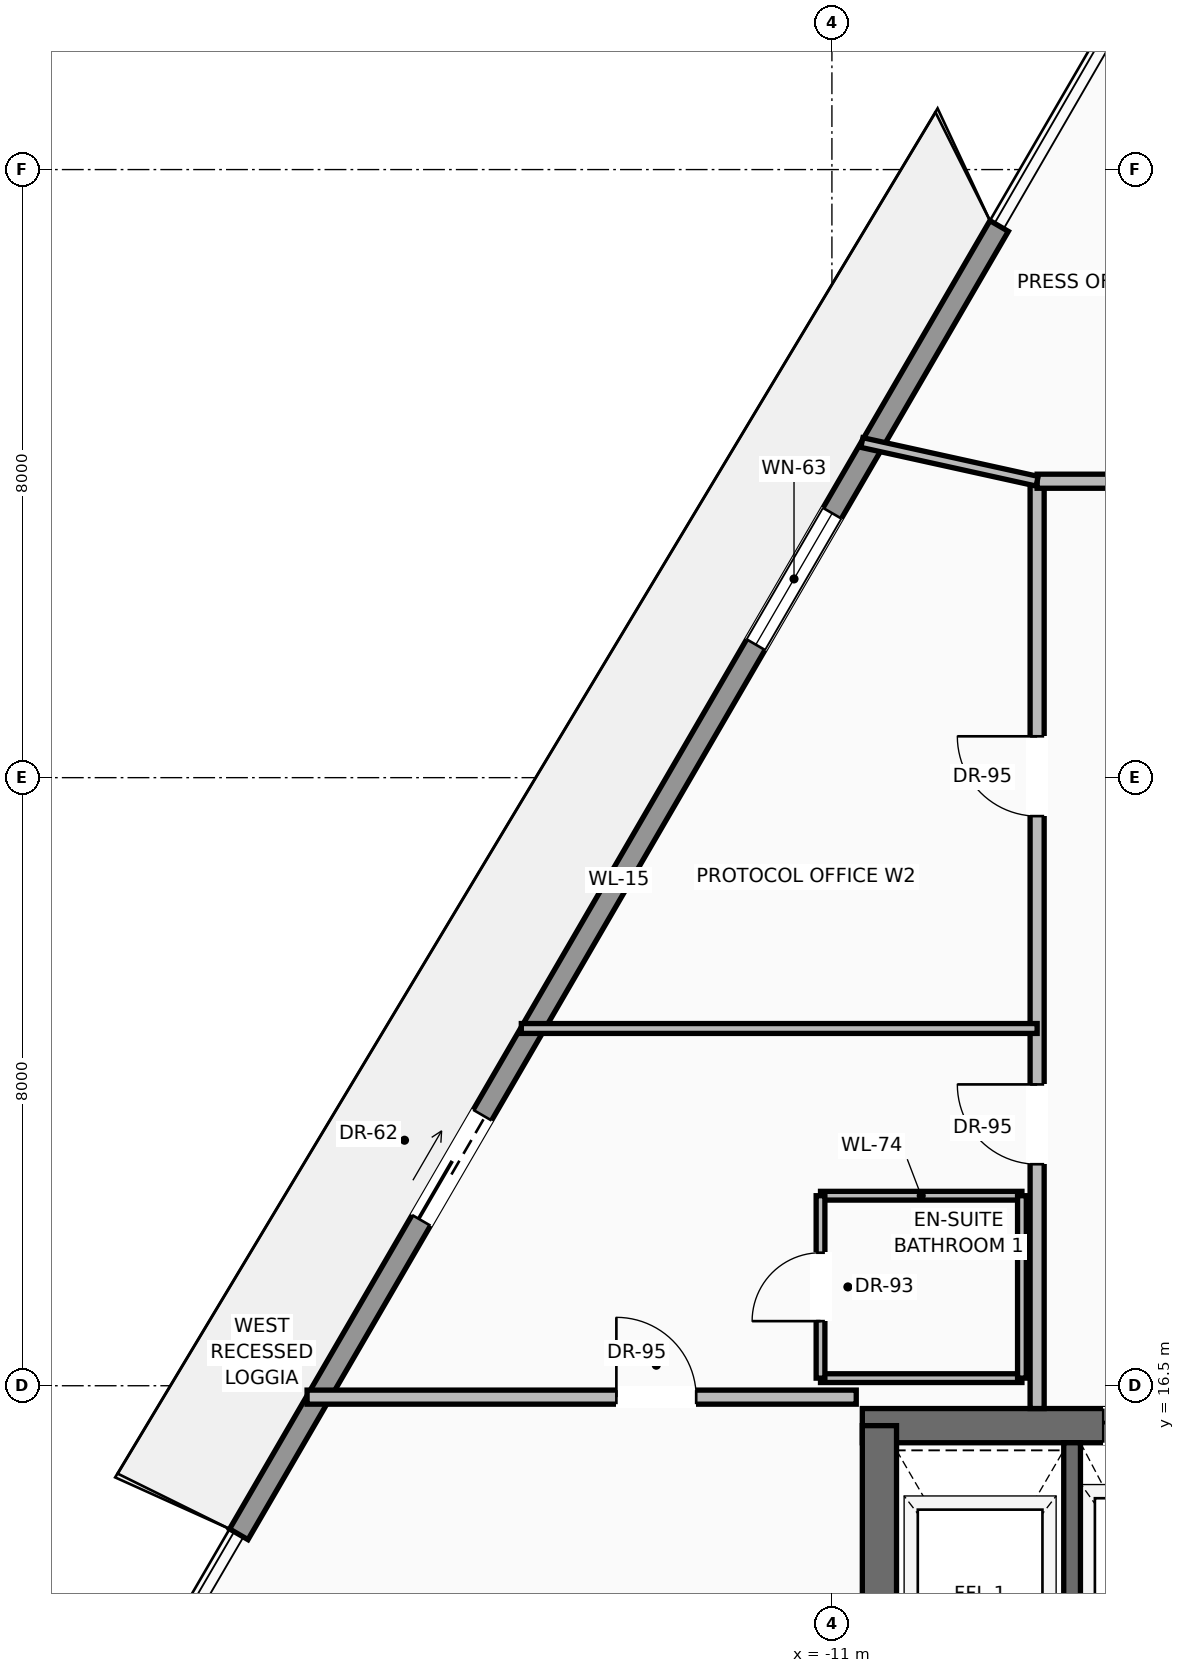
"""IFC4 building model, lengths in metres.
Left out: names, types, materials, properties, quantities, classifications, styles, units other than length and angle.
Written with IfcOpenShell. Run it as: python <this file> out.ifc"""

import sys

from ifc_helpers import new_model, si_unit, direction, frame, frame_2d, origin, place, context, subcontext, project, spatial, rectangle, extrude, source, transform, mapped, element, fill, save


model = new_model("IFC4")
c1 = context("Model", 3, precision=1e-05, world=origin(), true_north=direction((0.0, 1.0)))
c2 = subcontext(c1, "Body", "Model", "MODEL_VIEW")
j1 = project(units=[si_unit("LENGTHUNIT", "METRE"), si_unit("PLANEANGLEUNIT", "RADIAN")], contexts=[c1])
p1 = place(None, origin())
s1 = spatial("IfcSite", under=j1, at=p1, CompositionType="ELEMENT")
p2 = place(p1, origin())
s2 = spatial("IfcBuilding", under=s1, at=p2, CompositionType="ELEMENT")
p3 = place(p2, frame((0.0, 0.0, 262.65)))
s3 = spatial("IfcBuildingStorey", under=s2, at=p3, CompositionType="ELEMENT", Elevation=262.65)
p4 = place(p3, frame((-10.6, 15.975, 0.0), z_axis=(0.0, 0.0, 1.0), x_axis=(1.0, 0.0, 0.0)))
e1 = element("IfcWall", 1, at=p4, inside=s3, PredefinedType="SHEAR", context=c2, shape_type="SweptSolid", body=[
    extrude(rectangle(XDim=21.2, YDim=0.45, at=frame_2d((10.6, 0.0))), origin(), (0.0, 0.0, 1.0), 3.24),
])
p5 = place(p4, frame((3.17, 0.0, 0.0)))
e2 = element("IfcOpeningElement", 2, at=p5, cuts=e1, PredefinedType="OPENING", context=c2, shape_type="SweptSolid", body=[
    extrude(rectangle(XDim=1.3, YDim=2.3, at=frame_2d((0.65, 1.15))), frame((0.0, 0.235, 0.0), z_axis=(0.0, -1.0, 0.0), x_axis=(1.0, 0.0, 0.0)), (0.0, 0.0, 1.0), 0.47),
])
p6 = place(p4, frame((9.6, 0.0, 0.0)))
e3 = element("IfcOpeningElement", 3, at=p6, cuts=e1, PredefinedType="OPENING", context=c2, shape_type="SweptSolid", body=[
    extrude(rectangle(XDim=2.0, YDim=2.4, at=frame_2d((1.0, 1.2))), frame((0.0, 0.235, 0.0), z_axis=(0.0, -1.0, 0.0), x_axis=(1.0, 0.0, 0.0)), (0.0, 0.0, 1.0), 0.47),
])
p7 = place(p3, frame((-10.375, 0.625, 0.0), z_axis=(0.0, 0.0, 1.0), x_axis=(0.0, 1.0, 0.0)))
e4 = element("IfcWall", 4, at=p7, inside=s3, PredefinedType="SHEAR", context=c2, shape_type="SweptSolid", body=[
    extrude(rectangle(XDim=15.35, YDim=0.45, at=frame_2d((7.675, 0.0))), origin(), (0.0, 0.0, 1.0), 3.24),
])
p8 = place(p3, frame((-18.804, 14.545, 0.0), z_axis=(0.0, 0.0, 1.0), x_axis=(0.502487235879, 0.864584627309, 0.0)))
e5 = element("IfcWall", 5, at=p8, inside=s3, PredefinedType="SOLIDWALL", context=c2, shape_type="SweptSolid", body=[
    extrude(rectangle(XDim=19.908, YDim=0.28, at=frame_2d((9.954, 0.0))), origin(), (0.0, 0.0, 1.0), 2.82),
])
p9 = place(p8, frame((4.778, 0.0, 0.0)))
e6 = element("IfcOpeningElement", 6, at=p9, cuts=e5, PredefinedType="OPENING", context=c2, shape_type="SweptSolid", body=[
    extrude(rectangle(XDim=1.6, YDim=2.35, at=frame_2d((0.8, 1.175))), frame((0.0, 0.15, 0.0), z_axis=(0.0, -1.0, 0.0), x_axis=(1.0, 0.0, 0.0)), (0.0, 0.0, 1.0), 0.3),
])
p10 = place(p8, frame((13.538, 0.0, 0.9)))
e7 = element("IfcOpeningElement", 7, at=p10, cuts=e5, PredefinedType="OPENING", context=c2, shape_type="SweptSolid", body=[
    extrude(rectangle(XDim=2.0, YDim=1.75, at=frame_2d((1.0, 0.875))), frame((0.0, 0.15, 0.0), z_axis=(0.0, -1.0, 0.0), x_axis=(1.0, 0.0, 0.0)), (0.0, 0.0, 1.0), 0.3),
])
p11 = place(p3, frame((-7.84, 11.87, 0.0), z_axis=(0.0, 0.0, 1.0), x_axis=(0.0, 1.0, 0.0)))
e8 = element("IfcWall", 8, at=p11, inside=s3, PredefinedType="SOLIDWALL", context=c2, shape_type="SweptSolid", body=[
    extrude(rectangle(XDim=3.88, YDim=0.22, at=frame_2d((1.94, 0.0))), origin(), (0.0, 0.0, 1.0), 3.24),
])
p12 = place(p3, frame((-8.3, 16.2, 0.0), z_axis=(0.0, 0.0, 1.0), x_axis=(0.0, 1.0, 0.0)))
e9 = element("IfcWall", 9, at=p12, inside=s3, PredefinedType="PARTITIONING", context=c2, shape_type="SweptSolid", body=[
    extrude(rectangle(XDim=12.2, YDim=0.185, at=frame_2d((6.1, 0.0))), origin(), (0.0, 0.0, 1.0), 3.232),
])
p13 = place(p12, frame((3.214, 0.0, 0.0)))
e10 = element("IfcOpeningElement", 10, at=p13, cuts=e9, PredefinedType="OPENING", context=c2, shape_type="SweptSolid", body=[
    extrude(rectangle(XDim=1.05, YDim=2.25, at=frame_2d((0.525, 1.125))), frame((0.0, 0.103, 0.0), z_axis=(0.0, -1.0, 0.0), x_axis=(1.0, 0.0, 0.0)), (0.0, 0.0, 1.0), 0.205),
])
p14 = place(p12, frame((7.794, 0.0, 0.0)))
e11 = element("IfcOpeningElement", 11, at=p14, cuts=e9, PredefinedType="OPENING", context=c2, shape_type="SweptSolid", body=[
    extrude(rectangle(XDim=1.05, YDim=2.25, at=frame_2d((0.525, 1.125))), frame((0.0, 0.103, 0.0), z_axis=(0.0, -1.0, 0.0), x_axis=(1.0, 0.0, 0.0)), (0.0, 0.0, 1.0), 0.205),
])
p15 = place(p3, frame((-8.3, 28.4, 0.0), z_axis=(0.0, 0.0, 1.0), x_axis=(1.0, 0.0, 0.0)))
e12 = element("IfcWall", 12, at=p15, inside=s3, PredefinedType="PARTITIONING", context=c2, shape_type="SweptSolid", body=[
    extrude(rectangle(XDim=16.8, YDim=0.185, at=frame_2d((8.4, 0.0))), origin(), (0.0, 0.0, 1.0), 3.232),
])
p16 = place(p15, frame((3.498, 0.0, 0.0)))
e13 = element("IfcOpeningElement", 13, at=p16, cuts=e12, PredefinedType="OPENING", context=c2, shape_type="SweptSolid", body=[
    extrude(rectangle(XDim=1.05, YDim=2.25, at=frame_2d((0.525, 1.125))), frame((0.0, 0.103, 0.0), z_axis=(0.0, -1.0, 0.0), x_axis=(1.0, 0.0, 0.0)), (0.0, 0.0, 1.0), 0.205),
])
p17 = place(p15, frame((8.998, 0.0, 0.0)))
e14 = element("IfcOpeningElement", 14, at=p17, cuts=e12, PredefinedType="OPENING", context=c2, shape_type="SweptSolid", body=[
    extrude(rectangle(XDim=1.05, YDim=2.25, at=frame_2d((0.525, 1.125))), frame((0.0, 0.103, 0.0), z_axis=(0.0, -1.0, 0.0), x_axis=(1.0, 0.0, 0.0)), (0.0, 0.0, 1.0), 0.205),
])
p18 = place(p15, frame((12.052, 0.0, 0.0)))
e15 = element("IfcOpeningElement", 15, at=p18, cuts=e12, PredefinedType="OPENING", context=c2, shape_type="SweptSolid", body=[
    extrude(rectangle(XDim=1.05, YDim=2.25, at=frame_2d((0.525, 1.125))), frame((0.0, 0.103, 0.0), z_axis=(0.0, -1.0, 0.0), x_axis=(1.0, 0.0, 0.0)), (0.0, 0.0, 1.0), 0.205),
])
p19 = place(p15, frame((14.498, 0.0, 0.0)))
e16 = element("IfcOpeningElement", 16, at=p19, cuts=e12, PredefinedType="OPENING", context=c2, shape_type="SweptSolid", body=[
    extrude(rectangle(XDim=1.05, YDim=2.25, at=frame_2d((0.525, 1.125))), frame((0.0, 0.103, 0.0), z_axis=(0.0, -1.0, 0.0), x_axis=(1.0, 0.0, 0.0)), (0.0, 0.0, 1.0), 0.205),
])
p20 = place(p15, frame((1.052, 0.0, 0.0)))
e17 = element("IfcOpeningElement", 17, at=p20, cuts=e12, PredefinedType="OPENING", context=c2, shape_type="SweptSolid", body=[
    extrude(rectangle(XDim=1.05, YDim=2.25, at=frame_2d((0.525, 1.125))), frame((0.0, 0.103, 0.0), z_axis=(0.0, -1.0, 0.0), x_axis=(1.0, 0.0, 0.0)), (0.0, 0.0, 1.0), 0.205),
])
p21 = place(p3, frame((-17.905, 16.35, 0.0), z_axis=(0.0, 0.0, 1.0), x_axis=(1.0, 0.0, 0.0)))
e18 = element("IfcWall", 18, at=p21, inside=s3, PredefinedType="PARTITIONING", context=c2, shape_type="SweptSolid", body=[
    extrude(rectangle(XDim=7.225, YDim=0.185, at=frame_2d((3.613, 0.0))), origin(), (0.0, 0.0, 1.0), 3.232),
])
p22 = place(p21, frame((4.069, 0.0, 0.0)))
e19 = element("IfcOpeningElement", 19, at=p22, cuts=e18, PredefinedType="OPENING", context=c2, shape_type="SweptSolid", body=[
    extrude(rectangle(XDim=1.05, YDim=2.25, at=frame_2d((0.525, 1.125))), frame((0.0, 0.103, 0.0), z_axis=(0.0, -1.0, 0.0), x_axis=(1.0, 0.0, 0.0)), (0.0, 0.0, 1.0), 0.205),
])
p23 = place(p3, frame((-10.606, 28.909, 0.0), z_axis=(0.0, 0.0, 1.0), x_axis=(0.976516737467, -0.215441549956, 0.0)))
e20 = element("IfcWall", 20, at=p23, inside=s3, PredefinedType="PARTITIONING", context=c2, shape_type="SweptSolid", body=[
    extrude(rectangle(XDim=2.362, YDim=0.13, at=frame_2d((1.181, 0.0))), origin(), (0.0, 0.0, 1.0), 3.232),
])
for number, where, z_axis, x_axis in (
    (21, (-11.15, 16.6, 0.0), (0.0, 0.0, 1.0), (1.0, 0.0, 0.0)),
    (22, (-11.15, 19.0, 0.0), (0.0, 0.0, 1.0), (1.0, 0.0, 0.0)),
):
    element("IfcWall", number, at=place(p3, frame(where, z_axis=z_axis, x_axis=x_axis)), inside=s3, PredefinedType="PARTITIONING", context=c2, shape_type="SweptSolid", body=[
        extrude(rectangle(XDim=2.65, YDim=0.115, at=frame_2d((1.325, 0.0))), origin(), (0.0, 0.0, 1.0), 3.232),
    ])
p24 = place(p3, frame((-11.15, 16.6, 0.0), z_axis=(0.0, 0.0, 1.0), x_axis=(0.0, 1.0, 0.0)))
e23 = element("IfcWall", 23, at=p24, inside=s3, PredefinedType="PARTITIONING", context=c2, shape_type="SweptSolid", body=[
    extrude(rectangle(XDim=2.4, YDim=0.115, at=frame_2d((1.2, 0.0))), origin(), (0.0, 0.0, 1.0), 3.232),
])
p25 = place(p24, frame((0.75, 0.0, 0.0)))
e24 = element("IfcOpeningElement", 24, at=p25, cuts=e23, PredefinedType="OPENING", context=c2, shape_type="SweptSolid", body=[
    extrude(rectangle(XDim=0.9, YDim=2.15, at=frame_2d((0.45, 1.075))), frame((0.0, 0.067, 0.0), z_axis=(0.0, -1.0, 0.0), x_axis=(1.0, 0.0, 0.0)), (0.0, 0.0, 1.0), 0.135),
])
p26 = place(p3, frame((-8.5, 16.6, 0.0), z_axis=(0.0, 0.0, 1.0), x_axis=(0.0, 1.0, 0.0)))
e25 = element("IfcWall", 25, at=p26, inside=s3, PredefinedType="PARTITIONING", context=c2, shape_type="SweptSolid", body=[
    extrude(rectangle(XDim=2.4, YDim=0.115, at=frame_2d((1.2, 0.0))), origin(), (0.0, 0.0, 1.0), 3.232),
])
p27 = place(p3, frame((-15.086, 21.2, 0.0), z_axis=(0.0, 0.0, 1.0), x_axis=(1.0, 0.0, 0.0)))
e26 = element("IfcWall", 26, at=p27, inside=s3, PredefinedType="PARTITIONING", context=c2, shape_type="SweptSolid", body=[
    extrude(rectangle(XDim=6.786, YDim=0.13, at=frame_2d((3.393, 0.0))), origin(), (0.0, 0.0, 1.0), 3.232),
])
m1 = source(origin(), c2, "Body", "SweptSolid", [
    extrude(rectangle(XDim=1.6, YDim=2.35, at=frame_2d((0.8, 1.175))), frame((0.0, 0.025, 0.0), z_axis=(0.0, -1.0, 0.0), x_axis=(1.0, 0.0, 0.0)), (0.0, 0.0, 1.0), 0.05),
])
p28 = place(p9, origin())
e27 = element("IfcDoor", 27, at=p28, inside=s3, OperationType="SLIDING_TO_LEFT", PredefinedType="DOOR", context=c2, shape_type="MappedRepresentation", body=[
    mapped(m1, transform((0.0, 0.0, 0.0), scale=1.0)),
])
fill(e6, e27)
m2 = source(origin(), c2, "Body", "SweptSolid", [
    extrude(rectangle(XDim=2.0, YDim=1.75, at=frame_2d((1.0, 0.875))), frame((0.0, 0.03, 0.0), z_axis=(0.0, -1.0, 0.0), x_axis=(1.0, 0.0, 0.0)), (0.0, 0.0, 1.0), 0.06),
])
p29 = place(p10, origin())
e28 = element("IfcWindow", 28, at=p29, inside=s3, PartitioningType="SINGLE_PANEL", PredefinedType="WINDOW", context=c2, shape_type="MappedRepresentation", body=[
    mapped(m2, transform((0.0, 0.0, 0.0), scale=1.0)),
])
fill(e7, e28)
m3 = source(origin(), c2, "Body", "SweptSolid", [
    extrude(rectangle(XDim=1.3, YDim=2.3, at=frame_2d((0.65, 1.15))), frame((0.0, 0.025, 0.0), z_axis=(0.0, -1.0, 0.0), x_axis=(1.0, 0.0, 0.0)), (0.0, 0.0, 1.0), 0.05),
])
p30 = place(p5, origin())
e29 = element("IfcDoor", 29, at=p30, inside=s3, OperationType="SLIDING_TO_RIGHT", PredefinedType="DOOR", context=c2, shape_type="MappedRepresentation", body=[
    mapped(m3, transform((0.0, 0.0, 0.0), scale=1.0)),
])
fill(e2, e29)
m4 = source(origin(), c2, "Body", "SweptSolid", [
    extrude(rectangle(XDim=1.05, YDim=2.25, at=frame_2d((0.525, 1.125))), frame((0.0, 0.025, 0.0), z_axis=(0.0, -1.0, 0.0), x_axis=(1.0, 0.0, 0.0)), (0.0, 0.0, 1.0), 0.05),
])
p31 = place(p22, origin())
e30 = element("IfcDoor", 30, at=p31, inside=s3, OperationType="SINGLE_SWING_LEFT", PredefinedType="DOOR", context=c2, shape_type="MappedRepresentation", body=[
    mapped(m4, transform((0.0, 0.0, 0.0), scale=1.0)),
])
fill(e19, e30)
p32 = place(p13, origin())
e31 = element("IfcDoor", 31, at=p32, inside=s3, OperationType="SINGLE_SWING_RIGHT", PredefinedType="DOOR", context=c2, shape_type="MappedRepresentation", body=[
    mapped(m4, transform((0.0, 0.0, 0.0), scale=1.0)),
])
fill(e10, e31)
m5 = source(origin(), c2, "Body", "SweptSolid", [
    extrude(rectangle(XDim=0.9, YDim=2.15, at=frame_2d((0.45, 1.075))), frame((0.0, 0.025, 0.0), z_axis=(0.0, -1.0, 0.0), x_axis=(1.0, 0.0, 0.0)), (0.0, 0.0, 1.0), 0.05),
])
p33 = place(p25, origin())
e32 = element("IfcDoor", 32, at=p33, inside=s3, OperationType="SINGLE_SWING_LEFT", PredefinedType="DOOR", context=c2, shape_type="MappedRepresentation", body=[
    mapped(m5, transform((0.0, 0.0, 0.0), scale=1.0)),
])
fill(e24, e32)
p34 = place(p14, origin())
e33 = element("IfcDoor", 33, at=p34, inside=s3, OperationType="SINGLE_SWING_RIGHT", PredefinedType="DOOR", context=c2, shape_type="MappedRepresentation", body=[
    mapped(m4, transform((0.0, 0.0, 0.0), scale=1.0)),
])
fill(e11, e33)
save(model, sys.argv[1])
